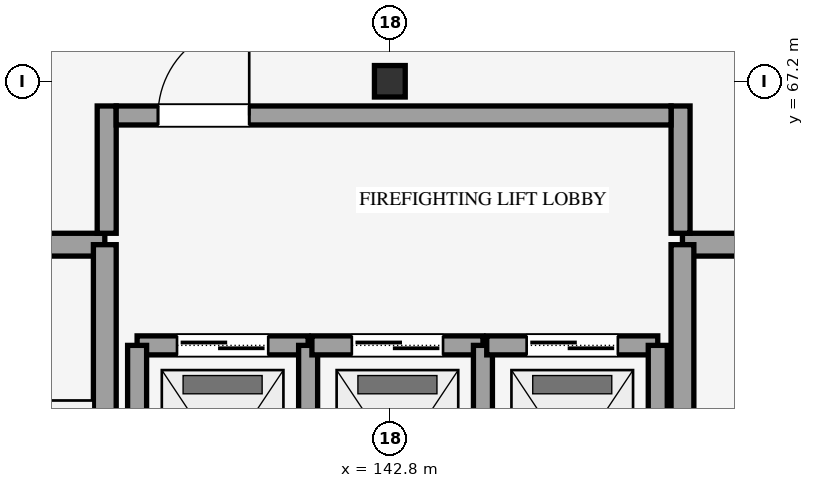
"""IFC4 building model, lengths in metres.
Left out: names, types, materials, properties, quantities, classifications, styles, units other than length and angle.
Written with IfcOpenShell. Run it as: python <this file> out.ifc"""

import sys

from ifc_helpers import new_model, si_unit, direction, frame, frame_2d, origin, origin_2d, place, context, subcontext, project, spatial, rectangle, i_section, extrude, element, fill, save


model = new_model("IFC4")
c1 = context("Model", 3, precision=1e-05, world=origin(), true_north=direction((0.0, 1.0)))
c2 = subcontext(c1, "Body", "Model", "MODEL_VIEW")
j1 = project(units=[si_unit("LENGTHUNIT", "METRE"), si_unit("PLANEANGLEUNIT", "RADIAN")], contexts=[c1])
p1 = place(None, origin())
s1 = spatial("IfcSite", under=j1, at=p1, CompositionType="ELEMENT")
p2 = place(p1, origin())
s2 = spatial("IfcBuilding", under=s1, at=p2, CompositionType="ELEMENT")
p3 = place(p2, frame((0.0, 0.0, -5.4)))
s3 = spatial("IfcBuildingStorey", under=s2, at=p3, CompositionType="ELEMENT", Elevation=-5.4)
p4 = place(p3, frame((142.8, 67.2, 0.0), z_axis=(0.0, 0.0, 1.0), x_axis=(1.0, 0.0, 0.0)))
e1 = element("IfcColumn", 1, at=p4, inside=s3, PredefinedType="COLUMN", context=c2, shape_type="SweptSolid", body=[
    extrude(i_section(OverallWidth=0.405, OverallDepth=0.414, WebThickness=0.018, FlangeThickness=0.028, FilletRadius=0.022, at=origin_2d()), origin(), (0.0, 0.0, 1.0), 5.4),
])
p5 = place(p3, frame((135.05, 65.05, 0.0), z_axis=(0.0, 0.0, 1.0), x_axis=(1.0, 0.0, 0.0)))
e2 = element("IfcWall", 2, at=p5, inside=s3, PredefinedType="SHEAR", context=c2, shape_type="SweptSolid", body=[
    extrude(rectangle(XDim=4.0, YDim=0.3, at=frame_2d((2.0, 0.0))), origin(), (0.0, 0.0, 1.0), 5.4),
])
p6 = place(p3, frame((139.05, 50.75, 0.0), z_axis=(0.0, 0.0, 1.0), x_axis=(0.0, 1.0, 0.0)))
e3 = element("IfcWall", 3, at=p6, inside=s3, PredefinedType="SHEAR", context=c2, shape_type="SweptSolid", body=[
    extrude(rectangle(XDim=14.3, YDim=0.3, at=frame_2d((7.15, 0.0))), origin(), (0.0, 0.0, 1.0), 5.4),
])
p7 = place(p3, frame((146.65, 65.05, 0.0), z_axis=(0.0, 0.0, 1.0), x_axis=(1.0, 0.0, 0.0)))
e4 = element("IfcWall", 4, at=p7, inside=s3, PredefinedType="SHEAR", context=c2, shape_type="SweptSolid", body=[
    extrude(rectangle(XDim=4.0, YDim=0.3, at=frame_2d((2.0, 0.0))), origin(), (0.0, 0.0, 1.0), 5.4),
])
p8 = place(p3, frame((146.65, 50.75, 0.0), z_axis=(0.0, 0.0, 1.0), x_axis=(0.0, 1.0, 0.0)))
e5 = element("IfcWall", 5, at=p8, inside=s3, PredefinedType="SHEAR", context=c2, shape_type="SweptSolid", body=[
    extrude(rectangle(XDim=14.3, YDim=0.3, at=frame_2d((7.15, 0.0))), origin(), (0.0, 0.0, 1.0), 5.4),
])
p9 = place(p3, frame((139.475, 63.725, 0.0), z_axis=(0.0, 0.0, 1.0), x_axis=(1.0, 0.0, 0.0)))
e6 = element("IfcWall", 6, at=p9, inside=s3, PredefinedType="SHEAR", context=c2, shape_type="SweptSolid", body=[
    extrude(rectangle(XDim=2.25, YDim=0.25, at=frame_2d((1.125, 0.0))), origin(), (0.0, 0.0, 1.0), 5.1),
])
p10 = place(p9, frame((0.525, 0.0, 0.0)))
e7 = element("IfcOpeningElement", 7, at=p10, cuts=e6, PredefinedType="OPENING", context=c2, shape_type="SweptSolid", body=[
    extrude(rectangle(XDim=1.2, YDim=2.18, at=frame_2d((0.6, 1.09))), frame((0.0, 0.135, 0.0), z_axis=(0.0, -1.0, 0.0), x_axis=(1.0, 0.0, 0.0)), (0.0, 0.0, 1.0), 0.27),
])
for number, where, z_axis, x_axis in (
    (8, (139.475, 60.675, 0.0), (0.0, 0.0, 1.0), (0.0, 1.0, 0.0)),
    (9, (141.725, 60.675, 0.0), (0.0, 0.0, 1.0), (0.0, 1.0, 0.0)),
):
    element("IfcWall", number, at=place(p3, frame(where, z_axis=z_axis, x_axis=x_axis)), inside=s3, PredefinedType="SHEAR", context=c2, shape_type="SweptSolid", body=[
        extrude(rectangle(XDim=3.05, YDim=0.25, at=frame_2d((1.525, 0.0))), origin(), (0.0, 0.0, 1.0), 5.1),
    ])
p11 = place(p3, frame((141.775, 63.725, 0.0), z_axis=(0.0, 0.0, 1.0), x_axis=(1.0, 0.0, 0.0)))
e10 = element("IfcWall", 10, at=p11, inside=s3, PredefinedType="SHEAR", context=c2, shape_type="SweptSolid", body=[
    extrude(rectangle(XDim=2.25, YDim=0.25, at=frame_2d((1.125, 0.0))), origin(), (0.0, 0.0, 1.0), 5.1),
])
p12 = place(p11, frame((0.525, 0.0, 0.0)))
e11 = element("IfcOpeningElement", 11, at=p12, cuts=e10, PredefinedType="OPENING", context=c2, shape_type="SweptSolid", body=[
    extrude(rectangle(XDim=1.2, YDim=2.18, at=frame_2d((0.6, 1.09))), frame((0.0, 0.135, 0.0), z_axis=(0.0, -1.0, 0.0), x_axis=(1.0, 0.0, 0.0)), (0.0, 0.0, 1.0), 0.27),
])
p13 = place(p3, frame((144.025, 60.675, 0.0), z_axis=(0.0, 0.0, 1.0), x_axis=(0.0, 1.0, 0.0)))
e12 = element("IfcWall", 12, at=p13, inside=s3, PredefinedType="SHEAR", context=c2, shape_type="SweptSolid", body=[
    extrude(rectangle(XDim=3.05, YDim=0.25, at=frame_2d((1.525, 0.0))), origin(), (0.0, 0.0, 1.0), 5.1),
])
p14 = place(p3, frame((144.075, 63.725, 0.0), z_axis=(0.0, 0.0, 1.0), x_axis=(1.0, 0.0, 0.0)))
e13 = element("IfcWall", 13, at=p14, inside=s3, PredefinedType="SHEAR", context=c2, shape_type="SweptSolid", body=[
    extrude(rectangle(XDim=2.25, YDim=0.25, at=frame_2d((1.125, 0.0))), origin(), (0.0, 0.0, 1.0), 5.1),
])
p15 = place(p14, frame((0.525, 0.0, 0.0)))
e14 = element("IfcOpeningElement", 14, at=p15, cuts=e13, PredefinedType="OPENING", context=c2, shape_type="SweptSolid", body=[
    extrude(rectangle(XDim=1.2, YDim=2.18, at=frame_2d((0.6, 1.09))), frame((0.0, 0.135, 0.0), z_axis=(0.0, -1.0, 0.0), x_axis=(1.0, 0.0, 0.0)), (0.0, 0.0, 1.0), 0.27),
])
p16 = place(p3, frame((146.325, 60.675, 0.0), z_axis=(0.0, 0.0, 1.0), x_axis=(0.0, 1.0, 0.0)))
e15 = element("IfcWall", 15, at=p16, inside=s3, PredefinedType="SHEAR", context=c2, shape_type="SweptSolid", body=[
    extrude(rectangle(XDim=3.05, YDim=0.25, at=frame_2d((1.525, 0.0))), origin(), (0.0, 0.0, 1.0), 5.1),
])
for number, where, z_axis, x_axis in (
    (16, (139.075, 65.2, 0.0), (0.0, 0.0, 1.0), (0.0, 1.0, 0.0)),
    (17, (146.625, 65.2, 0.0), (0.0, 0.0, 1.0), (0.0, 1.0, 0.0)),
):
    element("IfcWall", number, at=place(p3, frame(where, z_axis=z_axis, x_axis=x_axis)), inside=s3, PredefinedType="SHEAR", context=c2, shape_type="SweptSolid", body=[
        extrude(rectangle(XDim=1.675, YDim=0.25, at=frame_2d((0.837, 0.0))), origin(), (0.0, 0.0, 1.0), 5.1),
    ])
p17 = place(p3, frame((139.2, 66.75, 0.0), z_axis=(0.0, 0.0, 1.0), x_axis=(1.0, 0.0, 0.0)))
e18 = element("IfcWall", 18, at=p17, inside=s3, PredefinedType="SHEAR", context=c2, shape_type="SweptSolid", body=[
    extrude(rectangle(XDim=7.3, YDim=0.25, at=frame_2d((3.65, 0.0))), origin(), (0.0, 0.0, 1.0), 5.1),
])
p18 = place(p17, frame((0.55, 0.0, 0.0)))
e19 = element("IfcOpeningElement", 19, at=p18, cuts=e18, PredefinedType="OPENING", context=c2, shape_type="SweptSolid", body=[
    extrude(rectangle(XDim=1.2, YDim=2.15, at=frame_2d((0.6, 1.075))), frame((0.0, 0.135, 0.0), z_axis=(0.0, -1.0, 0.0), x_axis=(1.0, 0.0, 0.0)), (0.0, 0.0, 1.0), 0.27),
])
p19 = place(p10, origin())
e20 = element("IfcDoor", 20, at=p19, inside=s3, OperationType="DOUBLE_DOOR_SLIDING", PredefinedType="DOOR", context=c2, shape_type="SweptSolid", body=[
    extrude(rectangle(XDim=1.2, YDim=2.18, at=frame_2d((0.6, 1.09))), frame((0.0, 0.025, 0.0), z_axis=(0.0, -1.0, 0.0), x_axis=(1.0, 0.0, 0.0)), (0.0, 0.0, 1.0), 0.05),
])
fill(e7, e20)
p20 = place(p12, origin())
e21 = element("IfcDoor", 21, at=p20, inside=s3, OperationType="DOUBLE_DOOR_SLIDING", PredefinedType="DOOR", context=c2, shape_type="SweptSolid", body=[
    extrude(rectangle(XDim=1.2, YDim=2.18, at=frame_2d((0.6, 1.09))), frame((0.0, 0.025, 0.0), z_axis=(0.0, -1.0, 0.0), x_axis=(1.0, 0.0, 0.0)), (0.0, 0.0, 1.0), 0.05),
])
fill(e11, e21)
p21 = place(p15, origin())
e22 = element("IfcDoor", 22, at=p21, inside=s3, OperationType="DOUBLE_DOOR_SLIDING", PredefinedType="DOOR", context=c2, shape_type="SweptSolid", body=[
    extrude(rectangle(XDim=1.2, YDim=2.18, at=frame_2d((0.6, 1.09))), frame((0.0, 0.025, 0.0), z_axis=(0.0, -1.0, 0.0), x_axis=(1.0, 0.0, 0.0)), (0.0, 0.0, 1.0), 0.05),
])
fill(e14, e22)
p22 = place(p18, origin())
e23 = element("IfcDoor", 23, at=p22, inside=s3, OperationType="SINGLE_SWING_RIGHT", PredefinedType="DOOR", context=c2, shape_type="SweptSolid", body=[
    extrude(rectangle(XDim=1.2, YDim=2.15, at=frame_2d((0.6, 1.075))), frame((0.0, 0.025, 0.0), z_axis=(0.0, -1.0, 0.0), x_axis=(1.0, 0.0, 0.0)), (0.0, 0.0, 1.0), 0.05),
])
fill(e19, e23)
save(model, sys.argv[1])
